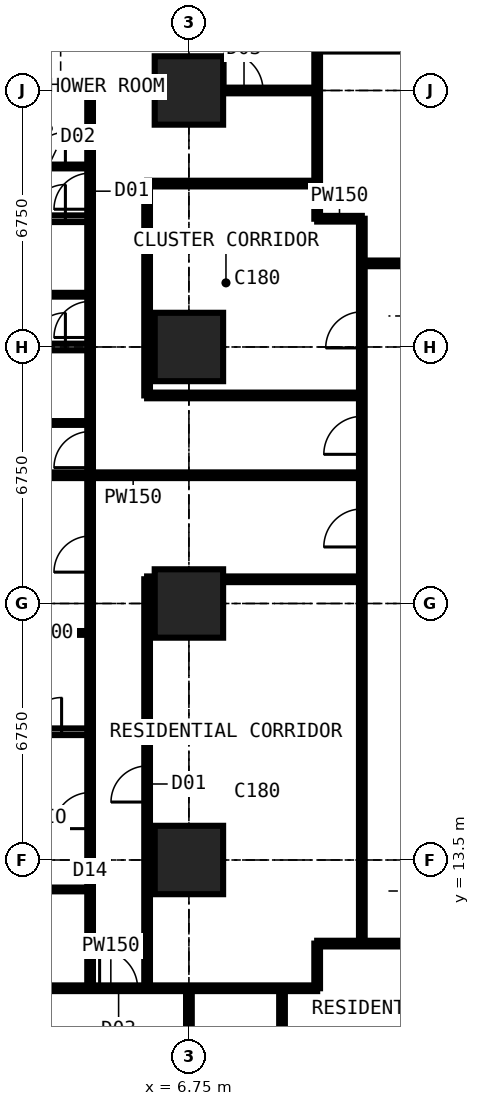
"""IFC4 building model, lengths in metres.
Left out: names, types, materials, properties, quantities, classifications, styles, units other than length and angle.
Written with IfcOpenShell. Run it as: python <this file> out.ifc"""

import sys

from ifc_helpers import new_model, si_unit, direction, frame, frame_2d, origin, origin_2d, place, context, subcontext, project, spatial, rectangle, extrude, element, fill, save


model = new_model("IFC4")
c1 = context("Model", 3, precision=1e-05, world=origin(), true_north=direction((0.0, 1.0)))
c2 = subcontext(c1, "Body", "Model", "MODEL_VIEW")
j1 = project(units=[si_unit("LENGTHUNIT", "METRE"), si_unit("PLANEANGLEUNIT", "RADIAN")], contexts=[c1])
p1 = place(None, origin())
s1 = spatial("IfcSite", under=j1, at=p1, CompositionType="ELEMENT")
p2 = place(p1, origin())
s2 = spatial("IfcBuilding", under=s1, at=p2, CompositionType="ELEMENT")
p3 = place(p2, frame((0.0, 0.0, 68.4)))
s3 = spatial("IfcBuildingStorey", under=s2, at=p3, CompositionType="ELEMENT", Elevation=68.4)
for number, where, z_axis, x_axis in (
    (1, (6.75, 13.5, 0.0), (0.0, 0.0, 1.0), (1.0, 0.0, 0.0)),
    (2, (6.75, 20.25, 0.0), (0.0, 0.0, 1.0), (1.0, 0.0, 0.0)),
    (3, (6.75, 27.0, 0.0), (0.0, 0.0, 1.0), (1.0, 0.0, 0.0)),
    (4, (6.75, 33.75, 0.0), (0.0, 0.0, 1.0), (1.0, 0.0, 0.0)),
):
    element("IfcColumn", number, at=place(p3, frame(where, z_axis=z_axis, x_axis=x_axis)), inside=s3, PredefinedType="COLUMN", context=c2, shape_type="SweptSolid", body=[
        extrude(rectangle(XDim=1.8, YDim=1.8, at=origin_2d()), origin(), (0.0, 0.0, 1.0), 3.6),
    ])
p4 = place(p3, frame((-0.734, 10.125, 0.0), z_axis=(0.0, 0.0, 1.0), x_axis=(1.0, 0.0, 0.0)))
e5 = element("IfcWall", 5, at=p4, inside=s3, PredefinedType="PARTITIONING", context=c2, shape_type="SweptSolid", body=[
    extrude(rectangle(XDim=10.859, YDim=0.15, at=frame_2d((5.429, 0.0))), origin(), (0.0, 0.0, 1.0), 3.375),
])
p5 = place(p4, frame((5.134, 0.0, 0.0)))
e6 = element("IfcOpeningElement", 6, at=p5, cuts=e5, PredefinedType="OPENING", context=c2, shape_type="SweptSolid", body=[
    extrude(rectangle(XDim=1.0, YDim=2.2, at=frame_2d((0.5, 1.1))), frame((0.0, 0.085, 0.0), z_axis=(0.0, -1.0, 0.0), x_axis=(1.0, 0.0, 0.0)), (0.0, 0.0, 1.0), 0.17),
])
p6 = place(p3, frame((-0.734, 16.875, 0.0), z_axis=(0.0, 0.0, 1.0), x_axis=(1.0, 0.0, 0.0)))
e7 = element("IfcWall", 7, at=p6, inside=s3, PredefinedType="PARTITIONING", context=c2, shape_type="SweptSolid", body=[
    extrude(rectangle(XDim=4.884, YDim=0.175, at=frame_2d((2.442, 0.0))), origin(), (0.0, 0.0, 1.0), 3.375),
])
p7 = place(p6, frame((3.234, 0.0, 0.0)))
e8 = element("IfcOpeningElement", 8, at=p7, cuts=e7, PredefinedType="OPENING", context=c2, shape_type="SweptSolid", body=[
    extrude(rectangle(XDim=0.9, YDim=2.2, at=frame_2d((0.45, 1.1))), frame((0.0, 0.097, 0.0), z_axis=(0.0, -1.0, 0.0), x_axis=(1.0, 0.0, 0.0)), (0.0, 0.0, 1.0), 0.195),
])
p8 = place(p3, frame((-0.734, 23.625, 0.0), z_axis=(0.0, 0.0, 1.0), x_axis=(1.0, 0.0, 0.0)))
e9 = element("IfcWall", 9, at=p8, inside=s3, PredefinedType="PARTITIONING", context=c2, shape_type="SweptSolid", body=[
    extrude(rectangle(XDim=12.034, YDim=0.15, at=frame_2d((6.017, 0.0))), origin(), (0.0, 0.0, 1.0), 3.375),
])
p9 = place(p3, frame((-0.734, 27.0, 0.0), z_axis=(0.0, 0.0, 1.0), x_axis=(1.0, 0.0, 0.0)))
e10 = element("IfcWall", 10, at=p9, inside=s3, PredefinedType="PARTITIONING", context=c2, shape_type="SweptSolid", body=[
    extrude(rectangle(XDim=4.884, YDim=0.175, at=frame_2d((2.442, 0.0))), origin(), (0.0, 0.0, 1.0), 2.61),
])
p10 = place(p9, frame((3.334, 0.0, 0.0)))
e11 = element("IfcOpeningElement", 11, at=p10, cuts=e10, PredefinedType="OPENING", context=c2, shape_type="SweptSolid", body=[
    extrude(rectangle(XDim=0.9, YDim=2.2, at=frame_2d((0.45, 1.1))), frame((0.0, 0.097, 0.0), z_axis=(0.0, -1.0, 0.0), x_axis=(1.0, 0.0, 0.0)), (0.0, 0.0, 1.0), 0.195),
])
p11 = place(p3, frame((-0.734, 30.375, 0.0), z_axis=(0.0, 0.0, 1.0), x_axis=(1.0, 0.0, 0.0)))
e12 = element("IfcWall", 12, at=p11, inside=s3, PredefinedType="PARTITIONING", context=c2, shape_type="SweptSolid", body=[
    extrude(rectangle(XDim=4.884, YDim=0.175, at=frame_2d((2.442, 0.0))), origin(), (0.0, 0.0, 1.0), 3.375),
])
p12 = place(p11, frame((3.334, 0.0, 0.0)))
e13 = element("IfcOpeningElement", 13, at=p12, cuts=e12, PredefinedType="OPENING", context=c2, shape_type="SweptSolid", body=[
    extrude(rectangle(XDim=0.9, YDim=2.2, at=frame_2d((0.45, 1.1))), frame((0.0, 0.097, 0.0), z_axis=(0.0, -1.0, 0.0), x_axis=(1.0, 0.0, 0.0)), (0.0, 0.0, 1.0), 0.195),
])
p13 = place(p3, frame((-0.734, 33.75, 0.0), z_axis=(0.0, 0.0, 1.0), x_axis=(1.0, 0.0, 0.0)))
e14 = element("IfcWall", 14, at=p13, inside=s3, PredefinedType="PARTITIONING", context=c2, shape_type="SweptSolid", body=[
    extrude(rectangle(XDim=10.859, YDim=0.15, at=frame_2d((5.429, 0.0))), origin(), (0.0, 0.0, 1.0), 2.877),
])
p14 = place(p13, frame((8.434, 0.0, 0.0)))
e15 = element("IfcOpeningElement", 15, at=p14, cuts=e14, PredefinedType="OPENING", context=c2, shape_type="SweptSolid", body=[
    extrude(rectangle(XDim=1.0, YDim=2.2, at=frame_2d((0.5, 1.1))), frame((0.0, 0.085, 0.0), z_axis=(0.0, -1.0, 0.0), x_axis=(1.0, 0.0, 0.0)), (0.0, 0.0, 1.0), 0.17),
])
for number, where, z_axis, x_axis in (
    (16, (1.75, 12.725, 0.0), (0.0, 0.0, 1.0), (1.0, 0.0, 0.0)),
    (17, (1.75, 19.475, 0.0), (0.0, 0.0, 1.0), (1.0, 0.0, 0.0)),
):
    element("IfcWall", number, at=place(p3, frame(where, z_axis=z_axis, x_axis=x_axis)), inside=s3, PredefinedType="PARTITIONING", context=c2, shape_type="SweptSolid", body=[
        extrude(rectangle(XDim=2.4, YDim=0.1, at=frame_2d((1.2, 0.0))), origin(), (0.0, 0.0, 1.0), 3.375),
    ])
for number, where, z_axis, x_axis in (
    (18, (1.95, 25.0, 0.0), (0.0, 0.0, 1.0), (1.0, 0.0, 0.0)),
    (19, (1.95, 28.375, 0.0), (0.0, 0.0, 1.0), (1.0, 0.0, 0.0)),
):
    element("IfcWall", number, at=place(p3, frame(where, z_axis=z_axis, x_axis=x_axis)), inside=s3, PredefinedType="PARTITIONING", context=c2, shape_type="SweptSolid", body=[
        extrude(rectangle(XDim=2.2, YDim=0.1, at=frame_2d((1.1, 0.0))), origin(), (0.0, 0.0, 1.0), 3.375),
    ])
p15 = place(p3, frame((1.95, 31.75, 0.0), z_axis=(0.0, 0.0, 1.0), x_axis=(1.0, 0.0, 0.0)))
e20 = element("IfcWall", 20, at=p15, inside=s3, PredefinedType="PARTITIONING", context=c2, shape_type="SweptSolid", body=[
    extrude(rectangle(XDim=2.2, YDim=0.1, at=frame_2d((1.1, 0.0))), origin(), (0.0, 0.0, 1.0), 3.375),
])
p16 = place(p15, frame((0.65, 0.0, 0.0)))
e21 = element("IfcOpeningElement", 21, at=p16, cuts=e20, PredefinedType="OPENING", context=c2, shape_type="SweptSolid", body=[
    extrude(rectangle(XDim=0.9, YDim=2.2, at=frame_2d((0.45, 1.1))), frame((0.0, 0.06, 0.0), z_axis=(0.0, -1.0, 0.0), x_axis=(1.0, 0.0, 0.0)), (0.0, 0.0, 1.0), 0.12),
])
p17 = place(p3, frame((4.15, 10.125, 0.0), z_axis=(0.0, 0.0, 1.0), x_axis=(0.0, 1.0, 0.0)))
e22 = element("IfcWall", 22, at=p17, inside=s3, PredefinedType="PARTITIONING", context=c2, shape_type="SweptSolid", body=[
    extrude(rectangle(XDim=23.625, YDim=0.15, at=frame_2d((11.812, 0.0))), origin(), (0.0, 0.0, 1.0), 3.375),
])
p18 = place(p17, frame((20.5, 0.0, 0.0)))
e23 = element("IfcOpeningElement", 23, at=p18, cuts=e22, PredefinedType="OPENING", context=c2, shape_type="SweptSolid", body=[
    extrude(rectangle(XDim=0.95, YDim=2.2, at=frame_2d((0.475, 1.1))), frame((0.0, 0.085, 0.0), z_axis=(0.0, -1.0, 0.0), x_axis=(1.0, 0.0, 0.0)), (0.0, 0.0, 1.0), 0.17),
])
p19 = place(p17, frame((17.125, 0.0, 0.0)))
e24 = element("IfcOpeningElement", 24, at=p19, cuts=e22, PredefinedType="OPENING", context=c2, shape_type="SweptSolid", body=[
    extrude(rectangle(XDim=0.95, YDim=2.2, at=frame_2d((0.475, 1.1))), frame((0.0, 0.085, 0.0), z_axis=(0.0, -1.0, 0.0), x_axis=(1.0, 0.0, 0.0)), (0.0, 0.0, 1.0), 0.17),
])
p20 = place(p17, frame((13.7, 0.0, 0.0)))
e25 = element("IfcOpeningElement", 25, at=p20, cuts=e22, PredefinedType="OPENING", context=c2, shape_type="SweptSolid", body=[
    extrude(rectangle(XDim=0.95, YDim=2.2, at=frame_2d((0.475, 1.1))), frame((0.0, 0.085, 0.0), z_axis=(0.0, -1.0, 0.0), x_axis=(1.0, 0.0, 0.0)), (0.0, 0.0, 1.0), 0.17),
])
p21 = place(p17, frame((4.2, 0.0, 0.0)))
e26 = element("IfcOpeningElement", 26, at=p21, cuts=e22, PredefinedType="OPENING", context=c2, shape_type="SweptSolid", body=[
    extrude(rectangle(XDim=0.95, YDim=2.2, at=frame_2d((0.475, 1.1))), frame((0.0, 0.085, 0.0), z_axis=(0.0, -1.0, 0.0), x_axis=(1.0, 0.0, 0.0)), (0.0, 0.0, 1.0), 0.17),
])
p22 = place(p17, frame((10.95, 0.0, 0.0)))
e27 = element("IfcOpeningElement", 27, at=p22, cuts=e22, PredefinedType="OPENING", context=c2, shape_type="SweptSolid", body=[
    extrude(rectangle(XDim=0.95, YDim=2.2, at=frame_2d((0.475, 1.1))), frame((0.0, 0.085, 0.0), z_axis=(0.0, -1.0, 0.0), x_axis=(1.0, 0.0, 0.0)), (0.0, 0.0, 1.0), 0.17),
])
p23 = place(p3, frame((5.65, 10.125, 0.0), z_axis=(0.0, 0.0, 1.0), x_axis=(0.0, 1.0, 0.0)))
e28 = element("IfcWall", 28, at=p23, inside=s3, PredefinedType="PARTITIONING", context=c2, shape_type="SweptSolid", body=[
    extrude(rectangle(XDim=10.762, YDim=0.15, at=frame_2d((5.381, 0.0))), origin(), (0.0, 0.0, 1.0), 3.375),
])
p24 = place(p23, frame((4.9, 0.0, 0.0)))
e29 = element("IfcOpeningElement", 29, at=p24, cuts=e28, PredefinedType="OPENING", context=c2, shape_type="SweptSolid", body=[
    extrude(rectangle(XDim=0.95, YDim=2.2, at=frame_2d((0.475, 1.1))), frame((0.0, 0.085, 0.0), z_axis=(0.0, -1.0, 0.0), x_axis=(1.0, 0.0, 0.0)), (0.0, 0.0, 1.0), 0.17),
])
p25 = place(p3, frame((5.65, 20.887, 0.0), z_axis=(0.0, 0.0, 1.0), x_axis=(1.0, 0.0, 0.0)))
e30 = element("IfcWall", 30, at=p25, inside=s3, PredefinedType="PARTITIONING", context=c2, shape_type="SweptSolid", body=[
    extrude(rectangle(XDim=5.65, YDim=0.15, at=frame_2d((2.825, 0.0))), origin(), (0.0, 0.0, 1.0), 3.375),
])
p26 = place(p3, frame((5.65, 25.725, 0.0), z_axis=(0.0, 0.0, 1.0), x_axis=(0.0, 1.0, 0.0)))
e31 = element("IfcWall", 31, at=p26, inside=s3, PredefinedType="PARTITIONING", context=c2, shape_type="SweptSolid", body=[
    extrude(rectangle(XDim=5.575, YDim=0.15, at=frame_2d((2.788, 0.0))), origin(), (0.0, 0.0, 1.0), 3.375),
])
p27 = place(p3, frame((5.65, 25.725, 0.0), z_axis=(0.0, 0.0, 1.0), x_axis=(1.0, 0.0, 0.0)))
e32 = element("IfcWall", 32, at=p27, inside=s3, PredefinedType="PARTITIONING", context=c2, shape_type="SweptSolid", body=[
    extrude(rectangle(XDim=5.65, YDim=0.15, at=frame_2d((2.825, 0.0))), origin(), (0.0, 0.0, 1.0), 3.375),
])
p28 = place(p3, frame((5.65, 31.3, 0.0), z_axis=(0.0, 0.0, 1.0), x_axis=(1.0, 0.0, 0.0)))
e33 = element("IfcWall", 33, at=p28, inside=s3, PredefinedType="PARTITIONING", context=c2, shape_type="SweptSolid", body=[
    extrude(rectangle(XDim=4.475, YDim=0.15, at=frame_2d((2.238, 0.0))), origin(), (0.0, 0.0, 1.0), 3.375),
])
p29 = place(p3, frame((6.75, -0.734, 0.0), z_axis=(0.0, 0.0, 1.0), x_axis=(0.0, 1.0, 0.0)))
e34 = element("IfcWall", 34, at=p29, inside=s3, PredefinedType="PARTITIONING", context=c2, shape_type="SweptSolid", body=[
    extrude(rectangle(XDim=10.859, YDim=0.15, at=frame_2d((5.429, 0.0))), origin(), (0.0, 0.0, 1.0), 2.877),
])
p30 = place(p3, frame((9.2, 5.65, 0.0), z_axis=(0.0, 0.0, 1.0), x_axis=(0.0, 1.0, 0.0)))
e35 = element("IfcWall", 35, at=p30, inside=s3, PredefinedType="PARTITIONING", context=c2, shape_type="SweptSolid", body=[
    extrude(rectangle(XDim=4.475, YDim=0.15, at=frame_2d((2.238, 0.0))), origin(), (0.0, 0.0, 1.0), 3.375),
])
p31 = place(p3, frame((10.125, 10.125, 0.0), z_axis=(0.0, 0.0, 1.0), x_axis=(0.0, 1.0, 0.0)))
e36 = element("IfcWall", 36, at=p31, inside=s3, PredefinedType="PARTITIONING", context=c2, shape_type="SweptSolid", body=[
    extrude(rectangle(XDim=1.175, YDim=0.15, at=frame_2d((0.587, 0.0))), origin(), (0.0, 0.0, 1.0), 3.375),
])
p32 = place(p3, frame((10.125, 11.3, 0.0), z_axis=(0.0, 0.0, 1.0), x_axis=(1.0, 0.0, 0.0)))
e37 = element("IfcWall", 37, at=p32, inside=s3, PredefinedType="PARTITIONING", context=c2, shape_type="SweptSolid", body=[
    extrude(rectangle(XDim=20.675, YDim=0.15, at=frame_2d((10.337, 0.0))), origin(), (0.0, 0.0, 1.0), 3.375),
])
p33 = place(p32, frame((8.375, 0.0, 0.0)))
e38 = element("IfcOpeningElement", 38, at=p33, cuts=e37, PredefinedType="OPENING", context=c2, shape_type="SweptSolid", body=[
    extrude(rectangle(XDim=1.0, YDim=2.2, at=frame_2d((0.5, 1.1))), frame((0.0, 0.085, 0.0), z_axis=(0.0, -1.0, 0.0), x_axis=(1.0, 0.0, 0.0)), (0.0, 0.0, 1.0), 0.17),
])
p34 = place(p32, frame((10.975, 0.0, 0.0)))
e39 = element("IfcOpeningElement", 39, at=p34, cuts=e37, PredefinedType="OPENING", context=c2, shape_type="SweptSolid", body=[
    extrude(rectangle(XDim=1.0, YDim=2.2, at=frame_2d((0.5, 1.1))), frame((0.0, 0.085, 0.0), z_axis=(0.0, -1.0, 0.0), x_axis=(1.0, 0.0, 0.0)), (0.0, 0.0, 1.0), 0.17),
])
p35 = place(p32, frame((3.925, 0.0, 0.0)))
e40 = element("IfcOpeningElement", 40, at=p35, cuts=e37, PredefinedType="OPENING", context=c2, shape_type="SweptSolid", body=[
    extrude(rectangle(XDim=0.95, YDim=2.2, at=frame_2d((0.475, 1.1))), frame((0.0, 0.085, 0.0), z_axis=(0.0, -1.0, 0.0), x_axis=(1.0, 0.0, 0.0)), (0.0, 0.0, 1.0), 0.17),
])
p36 = place(p3, frame((10.125, 30.375, 0.0), z_axis=(0.0, 0.0, 1.0), x_axis=(0.0, 1.0, 0.0)))
e41 = element("IfcWall", 41, at=p36, inside=s3, PredefinedType="PARTITIONING", context=c2, shape_type="SweptSolid", body=[
    extrude(rectangle(XDim=10.859, YDim=0.15, at=frame_2d((5.429, 0.0))), origin(), (0.0, 0.0, 1.0), 3.375),
])
p37 = place(p3, frame((10.125, 30.375, 0.0), z_axis=(0.0, 0.0, 1.0), x_axis=(1.0, 0.0, 0.0)))
e42 = element("IfcWall", 42, at=p37, inside=s3, PredefinedType="PARTITIONING", context=c2, shape_type="SweptSolid", body=[
    extrude(rectangle(XDim=1.175, YDim=0.15, at=frame_2d((0.587, 0.0))), origin(), (0.0, 0.0, 1.0), 3.375),
])
p38 = place(p3, frame((11.3, 11.3, 0.0), z_axis=(0.0, 0.0, 1.0), x_axis=(0.0, 1.0, 0.0)))
e43 = element("IfcWall", 43, at=p38, inside=s3, PredefinedType="PARTITIONING", context=c2, shape_type="SweptSolid", body=[
    extrude(rectangle(XDim=19.075, YDim=0.15, at=frame_2d((9.538, 0.0))), origin(), (0.0, 0.0, 1.0), 3.375),
])
p39 = place(p38, frame((12.875, 0.0, 0.0)))
e44 = element("IfcOpeningElement", 44, at=p39, cuts=e43, PredefinedType="OPENING", context=c2, shape_type="SweptSolid", body=[
    extrude(rectangle(XDim=1.0, YDim=2.2, at=frame_2d((0.5, 1.1))), frame((0.0, 0.085, 0.0), z_axis=(0.0, -1.0, 0.0), x_axis=(1.0, 0.0, 0.0)), (0.0, 0.0, 1.0), 0.17),
])
p40 = place(p38, frame((10.438, 0.0, 0.0)))
e45 = element("IfcOpeningElement", 45, at=p40, cuts=e43, PredefinedType="OPENING", context=c2, shape_type="SweptSolid", body=[
    extrude(rectangle(XDim=1.0, YDim=2.2, at=frame_2d((0.5, 1.1))), frame((0.0, 0.085, 0.0), z_axis=(0.0, -1.0, 0.0), x_axis=(1.0, 0.0, 0.0)), (0.0, 0.0, 1.0), 0.17),
])
p41 = place(p38, frame((15.675, 0.0, 0.0)))
e46 = element("IfcOpeningElement", 46, at=p41, cuts=e43, PredefinedType="OPENING", context=c2, shape_type="SweptSolid", body=[
    extrude(rectangle(XDim=0.95, YDim=2.2, at=frame_2d((0.475, 1.1))), frame((0.0, 0.085, 0.0), z_axis=(0.0, -1.0, 0.0), x_axis=(1.0, 0.0, 0.0)), (0.0, 0.0, 1.0), 0.17),
])
p42 = place(p3, frame((11.3, 29.2, 0.0), z_axis=(0.0, 0.0, 1.0), x_axis=(1.0, 0.0, 0.0)))
e47 = element("IfcWall", 47, at=p42, inside=s3, PredefinedType="PARTITIONING", context=c2, shape_type="SweptSolid", body=[
    extrude(rectangle(XDim=19.075, YDim=0.15, at=frame_2d((9.538, 0.0))), origin(), (0.0, 0.0, 1.0), 3.375),
])
p43 = place(p42, frame((12.875, 0.0, 0.0)))
e48 = element("IfcOpeningElement", 48, at=p43, cuts=e47, PredefinedType="OPENING", context=c2, shape_type="SweptSolid", body=[
    extrude(rectangle(XDim=1.0, YDim=2.2, at=frame_2d((0.5, 1.1))), frame((0.0, 0.085, 0.0), z_axis=(0.0, -1.0, 0.0), x_axis=(1.0, 0.0, 0.0)), (0.0, 0.0, 1.0), 0.17),
])
p44 = place(p42, frame((10.438, 0.0, 0.0)))
e49 = element("IfcOpeningElement", 49, at=p44, cuts=e47, PredefinedType="OPENING", context=c2, shape_type="SweptSolid", body=[
    extrude(rectangle(XDim=1.0, YDim=2.2, at=frame_2d((0.5, 1.1))), frame((0.0, 0.085, 0.0), z_axis=(0.0, -1.0, 0.0), x_axis=(1.0, 0.0, 0.0)), (0.0, 0.0, 1.0), 0.17),
])
p45 = place(p42, frame((14.875, 0.0, 0.0)))
e50 = element("IfcOpeningElement", 50, at=p45, cuts=e47, PredefinedType="OPENING", context=c2, shape_type="SweptSolid", body=[
    extrude(rectangle(XDim=0.95, YDim=2.2, at=frame_2d((0.475, 1.1))), frame((0.0, 0.085, 0.0), z_axis=(0.0, -1.0, 0.0), x_axis=(1.0, 0.0, 0.0)), (0.0, 0.0, 1.0), 0.17),
])
p46 = place(p5, origin())
e51 = element("IfcDoor", 51, at=p46, inside=s3, OperationType="SINGLE_SWING_LEFT", PredefinedType="DOOR", context=c2, shape_type="SweptSolid", body=[
    extrude(rectangle(XDim=1.0, YDim=2.2, at=frame_2d((0.5, 1.1))), frame((0.0, 0.025, 0.0), z_axis=(0.0, -1.0, 0.0), x_axis=(1.0, 0.0, 0.0)), (0.0, 0.0, 1.0), 0.05),
])
fill(e6, e51)
p47 = place(p14, origin())
e52 = element("IfcDoor", 52, at=p47, inside=s3, OperationType="SINGLE_SWING_LEFT", PredefinedType="DOOR", context=c2, shape_type="SweptSolid", body=[
    extrude(rectangle(XDim=1.0, YDim=2.2, at=frame_2d((0.5, 1.1))), frame((0.0, 0.025, 0.0), z_axis=(0.0, -1.0, 0.0), x_axis=(1.0, 0.0, 0.0)), (0.0, 0.0, 1.0), 0.05),
])
fill(e15, e52)
p48 = place(p18, origin())
e53 = element("IfcDoor", 53, at=p48, inside=s3, OperationType="SINGLE_SWING_LEFT", PredefinedType="DOOR", context=c2, shape_type="SweptSolid", body=[
    extrude(rectangle(XDim=0.95, YDim=2.2, at=frame_2d((0.475, 1.1))), frame((0.0, 0.025, 0.0), z_axis=(0.0, -1.0, 0.0), x_axis=(1.0, 0.0, 0.0)), (0.0, 0.0, 1.0), 0.05),
])
fill(e23, e53)
p49 = place(p16, origin())
e54 = element("IfcDoor", 54, at=p49, inside=s3, OperationType="SINGLE_SWING_RIGHT", PredefinedType="DOOR", context=c2, shape_type="SweptSolid", body=[
    extrude(rectangle(XDim=0.9, YDim=2.2, at=frame_2d((0.45, 1.1))), frame((0.0, 0.025, 0.0), z_axis=(0.0, -1.0, 0.0), x_axis=(1.0, 0.0, 0.0)), (0.0, 0.0, 1.0), 0.05),
])
fill(e21, e54)
p50 = place(p19, origin())
e55 = element("IfcDoor", 55, at=p50, inside=s3, OperationType="SINGLE_SWING_LEFT", PredefinedType="DOOR", context=c2, shape_type="SweptSolid", body=[
    extrude(rectangle(XDim=0.95, YDim=2.2, at=frame_2d((0.475, 1.1))), frame((0.0, 0.025, 0.0), z_axis=(0.0, -1.0, 0.0), x_axis=(1.0, 0.0, 0.0)), (0.0, 0.0, 1.0), 0.05),
])
fill(e24, e55)
p51 = place(p12, origin())
e56 = element("IfcDoor", 56, at=p51, inside=s3, OperationType="SINGLE_SWING_RIGHT", PredefinedType="DOOR", context=c2, shape_type="SweptSolid", body=[
    extrude(rectangle(XDim=0.9, YDim=2.2, at=frame_2d((0.45, 1.1))), frame((0.0, 0.025, 0.0), z_axis=(0.0, -1.0, 0.0), x_axis=(1.0, 0.0, 0.0)), (0.0, 0.0, 1.0), 0.05),
])
fill(e13, e56)
p52 = place(p20, origin())
e57 = element("IfcDoor", 57, at=p52, inside=s3, OperationType="SINGLE_SWING_LEFT", PredefinedType="DOOR", context=c2, shape_type="SweptSolid", body=[
    extrude(rectangle(XDim=0.95, YDim=2.2, at=frame_2d((0.475, 1.1))), frame((0.0, 0.025, 0.0), z_axis=(0.0, -1.0, 0.0), x_axis=(1.0, 0.0, 0.0)), (0.0, 0.0, 1.0), 0.05),
])
fill(e25, e57)
p53 = place(p10, origin())
e58 = element("IfcDoor", 58, at=p53, inside=s3, OperationType="SINGLE_SWING_RIGHT", PredefinedType="DOOR", context=c2, shape_type="SweptSolid", body=[
    extrude(rectangle(XDim=0.9, YDim=2.2, at=frame_2d((0.45, 1.1))), frame((0.0, 0.025, 0.0), z_axis=(0.0, -1.0, 0.0), x_axis=(1.0, 0.0, 0.0)), (0.0, 0.0, 1.0), 0.05),
])
fill(e11, e58)
p54 = place(p39, origin())
e59 = element("IfcDoor", 59, at=p54, inside=s3, OperationType="SINGLE_SWING_LEFT", PredefinedType="DOOR", context=c2, shape_type="SweptSolid", body=[
    extrude(rectangle(XDim=1.0, YDim=2.2, at=frame_2d((0.5, 1.1))), frame((0.0, 0.025, 0.0), z_axis=(0.0, -1.0, 0.0), x_axis=(1.0, 0.0, 0.0)), (0.0, 0.0, 1.0), 0.05),
])
fill(e44, e59)
p55 = place(p21, origin())
e60 = element("IfcDoor", 60, at=p55, inside=s3, OperationType="SINGLE_SWING_LEFT", PredefinedType="DOOR", context=c2, shape_type="SweptSolid", body=[
    extrude(rectangle(XDim=0.95, YDim=2.2, at=frame_2d((0.475, 1.1))), frame((0.0, 0.025, 0.0), z_axis=(0.0, -1.0, 0.0), x_axis=(1.0, 0.0, 0.0)), (0.0, 0.0, 1.0), 0.05),
])
fill(e26, e60)
p56 = place(p22, origin())
e61 = element("IfcDoor", 61, at=p56, inside=s3, OperationType="SINGLE_SWING_LEFT", PredefinedType="DOOR", context=c2, shape_type="SweptSolid", body=[
    extrude(rectangle(XDim=0.95, YDim=2.2, at=frame_2d((0.475, 1.1))), frame((0.0, 0.025, 0.0), z_axis=(0.0, -1.0, 0.0), x_axis=(1.0, 0.0, 0.0)), (0.0, 0.0, 1.0), 0.05),
])
fill(e27, e61)
p57 = place(p7, origin())
e62 = element("IfcDoor", 62, at=p57, inside=s3, OperationType="SINGLE_SWING_RIGHT", PredefinedType="DOOR", context=c2, shape_type="SweptSolid", body=[
    extrude(rectangle(XDim=0.9, YDim=2.2, at=frame_2d((0.45, 1.1))), frame((0.0, 0.025, 0.0), z_axis=(0.0, -1.0, 0.0), x_axis=(1.0, 0.0, 0.0)), (0.0, 0.0, 1.0), 0.05),
])
fill(e8, e62)
p58 = place(p40, origin())
e63 = element("IfcDoor", 63, at=p58, inside=s3, OperationType="SINGLE_SWING_LEFT", PredefinedType="DOOR", context=c2, shape_type="SweptSolid", body=[
    extrude(rectangle(XDim=1.0, YDim=2.2, at=frame_2d((0.5, 1.1))), frame((0.0, 0.025, 0.0), z_axis=(0.0, -1.0, 0.0), x_axis=(1.0, 0.0, 0.0)), (0.0, 0.0, 1.0), 0.05),
])
fill(e45, e63)
p59 = place(p41, origin())
e64 = element("IfcDoor", 64, at=p59, inside=s3, OperationType="SINGLE_SWING_LEFT", PredefinedType="DOOR", context=c2, shape_type="SweptSolid", body=[
    extrude(rectangle(XDim=0.95, YDim=2.2, at=frame_2d((0.475, 1.1))), frame((0.0, 0.025, 0.0), z_axis=(0.0, -1.0, 0.0), x_axis=(1.0, 0.0, 0.0)), (0.0, 0.0, 1.0), 0.05),
])
fill(e46, e64)
p60 = place(p24, origin())
e65 = element("IfcDoor", 65, at=p60, inside=s3, OperationType="SINGLE_SWING_LEFT", PredefinedType="DOOR", context=c2, shape_type="SweptSolid", body=[
    extrude(rectangle(XDim=0.95, YDim=2.2, at=frame_2d((0.475, 1.1))), frame((0.0, 0.025, 0.0), z_axis=(0.0, -1.0, 0.0), x_axis=(1.0, 0.0, 0.0)), (0.0, 0.0, 1.0), 0.05),
])
fill(e29, e65)
save(model, sys.argv[1])
